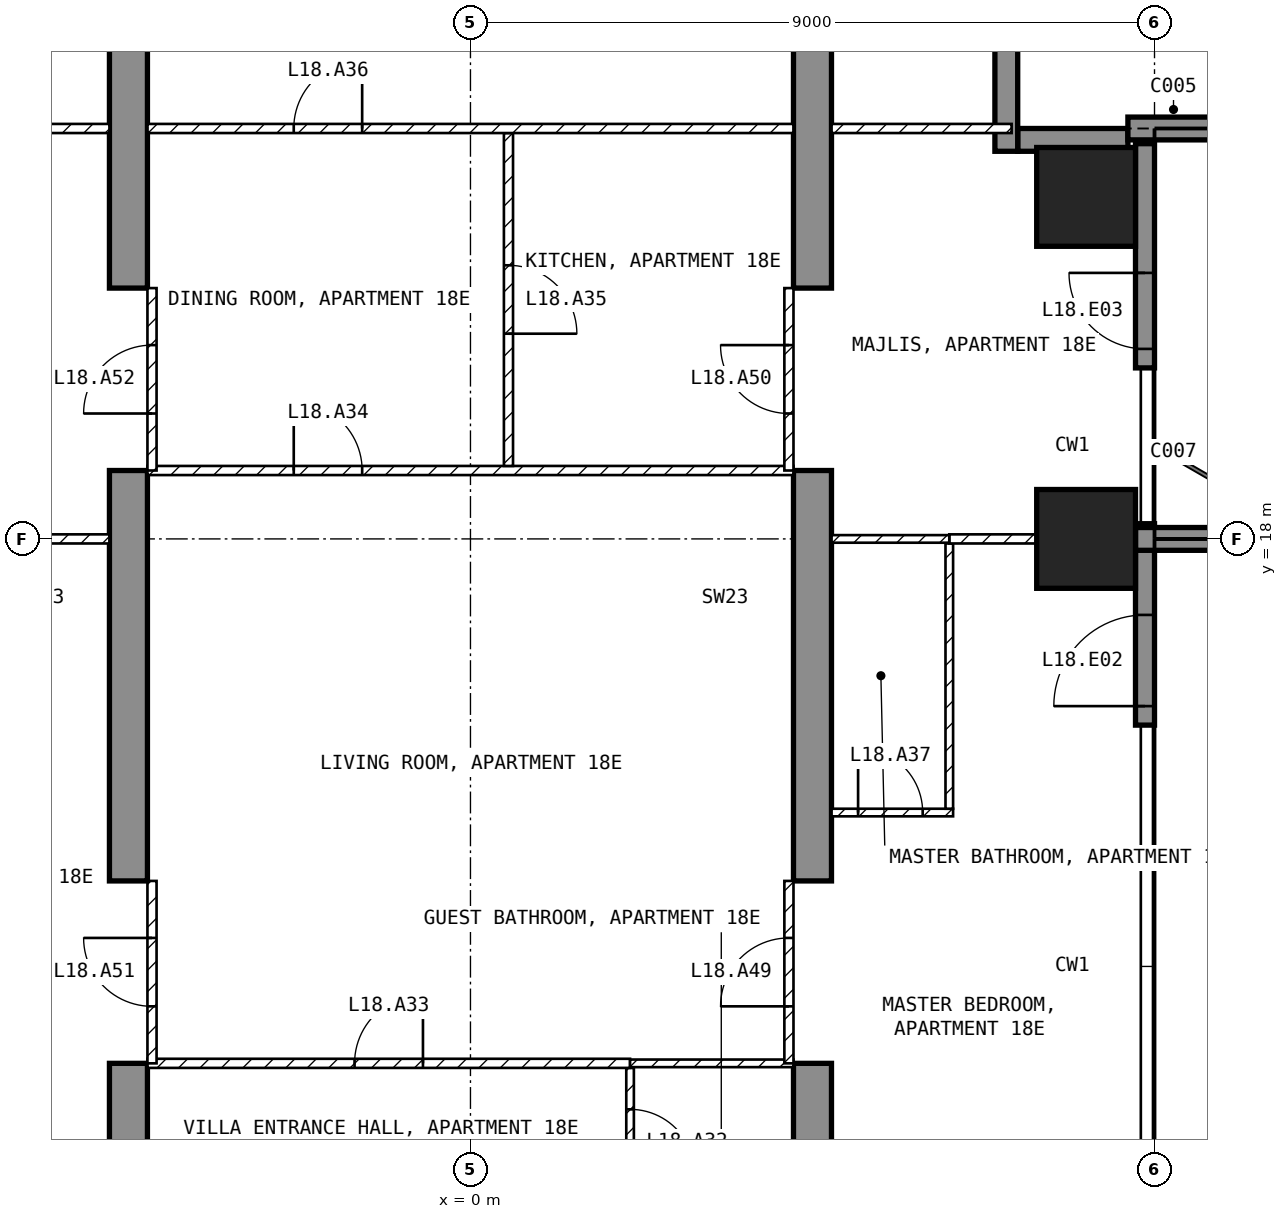
"""IFC4 building model, lengths in metres.
Left out: names, types, materials, properties, quantities, classifications, styles, units other than length and angle.
Written with IfcOpenShell. Run it as: python <this file> out.ifc"""

import sys

from ifc_helpers import new_model, si_unit, direction, frame, frame_2d, origin, origin_2d, place, context, subcontext, project, spatial, polyline, rectangle, outline, extrude, element, fill, save


model = new_model("IFC4")
c1 = context("Model", 3, precision=1e-05, world=origin(), true_north=direction((0.0, 1.0)))
c2 = subcontext(c1, "Body", "Model", "MODEL_VIEW")
j1 = project(units=[si_unit("LENGTHUNIT", "METRE"), si_unit("PLANEANGLEUNIT", "RADIAN")], contexts=[c1])
p1 = place(None, origin())
s1 = spatial("IfcSite", under=j1, at=p1, CompositionType="ELEMENT")
p2 = place(p1, origin())
s2 = spatial("IfcBuilding", under=s1, at=p2, CompositionType="ELEMENT")
p3 = place(p2, frame((0.0, 0.0, 82.0)))
s3 = spatial("IfcBuildingStorey", under=s2, at=p3, CompositionType="ELEMENT", Elevation=82.0)
for number, where, z_axis, x_axis in (
    (1, (8.1, 18.0, -0.25), (0.0, 0.0, 1.0), (1.0, 0.0, 0.0)),
    (2, (8.1, 22.5, -0.25), (0.0, 0.0, 1.0), (1.0, 0.0, 0.0)),
):
    element("IfcColumn", number, at=place(p3, frame(where, z_axis=z_axis, x_axis=x_axis)), inside=s3, PredefinedType="COLUMN", context=c2, shape_type="SweptSolid", body=[
        extrude(rectangle(XDim=1.3, YDim=1.3, at=origin_2d()), origin(), (0.0, 0.0, 1.0), 3.5),
    ])
for number, where, z_axis, x_axis in (
    (3, (-4.75, 9.0, -0.25), (1.0, 0.0, 0.0), (0.0, 1.0, 0.0)),
    (4, (4.25, 9.0, -0.25), (1.0, 0.0, 0.0), (0.0, 1.0, 0.0)),
):
    element("IfcWall", number, at=place(p3, frame(where, z_axis=z_axis, x_axis=x_axis)), inside=s3, PredefinedType="SHEAR", context=c2, shape_type="SweptSolid", body=[
        extrude(outline(polyline([(0.0, 0.0), (2.1, 0.0), (2.1, 2.65), (4.5, 2.65), (4.5, 0.0), (9.9, 0.0), (9.9, 2.65), (12.3, 2.65), (12.3, 0.0), (16.45, 0.0), (16.45, 3.5), (0.0, 3.5), (0.0, 0.0)])), origin(), (0.0, 0.0, 1.0), 0.5),
    ])
p4 = place(p3, frame((8.875, 15.55, 0.0), z_axis=(0.0, 0.0, 1.0), x_axis=(0.0, 1.0, 0.0)))
e5 = element("IfcWall", 5, at=p4, inside=s3, PredefinedType="SOLIDWALL", context=c2, shape_type="SweptSolid", body=[
    extrude(rectangle(XDim=2.65, YDim=0.25, at=frame_2d((1.325, 0.0))), origin(), (0.0, 0.0, 1.0), 3.25),
])
p5 = place(p4, frame((0.25, 0.0, 0.0)))
e6 = element("IfcOpeningElement", 6, at=p5, cuts=e5, PredefinedType="OPENING", context=c2, shape_type="SweptSolid", body=[
    extrude(rectangle(XDim=1.2, YDim=2.4, at=frame_2d((0.6, 1.2))), frame((0.0, 0.135, 0.0), z_axis=(0.0, -1.0, 0.0), x_axis=(1.0, 0.0, 0.0)), (0.0, 0.0, 1.0), 0.27),
])
p6 = place(p3, frame((8.875, 20.25, 0.0), z_axis=(0.0, 0.0, 1.0), x_axis=(0.0, 1.0, 0.0)))
e7 = element("IfcWall", 7, at=p6, inside=s3, PredefinedType="SOLIDWALL", context=c2, shape_type="SweptSolid", body=[
    extrude(rectangle(XDim=2.95, YDim=0.25, at=frame_2d((1.475, 0.0))), origin(), (0.0, 0.0, 1.0), 3.25),
])
p7 = place(p6, frame((0.25, 0.0, 0.0)))
e8 = element("IfcOpeningElement", 8, at=p7, cuts=e7, PredefinedType="OPENING", context=c2, shape_type="SweptSolid", body=[
    extrude(rectangle(XDim=1.0, YDim=2.4, at=frame_2d((0.5, 1.2))), frame((0.0, 0.135, 0.0), z_axis=(0.0, -1.0, 0.0), x_axis=(1.0, 0.0, 0.0)), (0.0, 0.0, 1.0), 0.27),
])
p8 = place(p3, frame((8.65, 23.25, 0.0), z_axis=(0.0, 0.0, 1.0), x_axis=(-1.0, 0.0, 0.0)))
e9 = element("IfcWall", 9, at=p8, inside=s3, PredefinedType="SOLIDWALL", context=c2, shape_type="SweptSolid", body=[
    extrude(rectangle(XDim=1.45, YDim=0.3, at=frame_2d((0.725, 0.0))), origin(), (0.0, 0.0, 1.0), 3.25),
])
p9 = place(p3, frame((7.05, 23.1, 0.0), z_axis=(0.0, 0.0, 1.0), x_axis=(0.0, 1.0, 0.0)))
e10 = element("IfcWall", 10, at=p9, inside=s3, PredefinedType="SOLIDWALL", context=c2, shape_type="SweptSolid", body=[
    extrude(rectangle(XDim=1.8, YDim=0.3, at=frame_2d((0.9, 0.0))), origin(), (0.0, 0.0, 1.0), 3.25),
])
p10 = place(p3, frame((8.75, 18.0, 0.0), z_axis=(0.0, 0.0, 1.0), x_axis=(1.0, 0.0, 0.0)))
e11 = element("IfcWall", 11, at=p10, inside=s3, PredefinedType="SOLIDWALL", context=c2, shape_type="SweptSolid", body=[
    extrude(rectangle(XDim=2.95, YDim=0.3, at=frame_2d((1.475, 0.0))), origin(), (0.0, 0.0, 1.0), 3.25),
])
p11 = place(p3, frame((8.65, 23.4, 0.0), z_axis=(0.0, 0.0, 1.0), x_axis=(1.0, 0.0, 0.0)))
e12 = element("IfcWall", 12, at=p11, inside=s3, PredefinedType="SOLIDWALL", context=c2, shape_type="SweptSolid", body=[
    extrude(rectangle(XDim=3.05, YDim=0.3, at=frame_2d((1.525, 0.0))), origin(), (0.0, 0.0, 1.0), 3.25),
])
p12 = place(p3, frame((2.1, 11.04, 0.0), z_axis=(0.0, 0.0, 1.0), x_axis=(0.0, -1.0, 0.0)))
e13 = element("IfcWall", 13, at=p12, inside=s3, PredefinedType="PARTITIONING", context=c2, shape_type="SweptSolid", body=[
    extrude(rectangle(XDim=1.94, YDim=0.1, at=frame_2d((0.97, 0.0))), origin(), (0.0, 0.0, 1.0), 3.25),
])
p13 = place(p12, frame((0.545, 0.0, 0.0)))
e14 = element("IfcOpeningElement", 14, at=p13, cuts=e13, PredefinedType="OPENING", context=c2, shape_type="SweptSolid", body=[
    extrude(rectangle(XDim=0.85, YDim=2.1, at=frame_2d((0.425, 1.05))), frame((0.0, 0.06, 0.0), z_axis=(0.0, -1.0, 0.0), x_axis=(1.0, 0.0, 0.0)), (0.0, 0.0, 1.0), 0.12),
])
p14 = place(p3, frame((-4.25, 11.1, 0.0), z_axis=(0.0, 0.0, 1.0), x_axis=(1.0, 0.0, 0.0)))
e15 = element("IfcWall", 15, at=p14, inside=s3, PredefinedType="PARTITIONING", context=c2, shape_type="SweptSolid", body=[
    extrude(rectangle(XDim=6.35, YDim=0.12, at=frame_2d((3.175, 0.0))), origin(), (0.0, 0.0, 1.0), 3.25),
])
p15 = place(p14, frame((2.725, 0.0, 0.0)))
e16 = element("IfcOpeningElement", 16, at=p15, cuts=e15, PredefinedType="OPENING", context=c2, shape_type="SweptSolid", body=[
    extrude(rectangle(XDim=0.9, YDim=2.1, at=frame_2d((0.45, 1.05))), frame((0.0, 0.07, 0.0), z_axis=(0.0, -1.0, 0.0), x_axis=(1.0, 0.0, 0.0)), (0.0, 0.0, 1.0), 0.14),
])
p16 = place(p3, frame((2.1, 11.1, 0.0), z_axis=(0.0, 0.0, 1.0), x_axis=(1.0, 0.0, 0.0)))
e17 = element("IfcWall", 17, at=p16, inside=s3, PredefinedType="PARTITIONING", context=c2, shape_type="SweptSolid", body=[
    extrude(rectangle(XDim=2.15, YDim=0.1, at=frame_2d((1.075, 0.0))), origin(), (0.0, 0.0, 1.0), 3.25),
])
p17 = place(p3, frame((-4.25, 18.9, 0.0), z_axis=(0.0, 0.0, 1.0), x_axis=(1.0, 0.0, 0.0)))
e18 = element("IfcWall", 18, at=p17, inside=s3, PredefinedType="PARTITIONING", context=c2, shape_type="SweptSolid", body=[
    extrude(rectangle(XDim=8.5, YDim=0.12, at=frame_2d((4.25, 0.0))), origin(), (0.0, 0.0, 1.0), 3.25),
])
p18 = place(p17, frame((1.925, 0.0, 0.0)))
e19 = element("IfcOpeningElement", 19, at=p18, cuts=e18, PredefinedType="OPENING", context=c2, shape_type="SweptSolid", body=[
    extrude(rectangle(XDim=0.9, YDim=2.1, at=frame_2d((0.45, 1.05))), frame((0.0, 0.07, 0.0), z_axis=(0.0, -1.0, 0.0), x_axis=(1.0, 0.0, 0.0)), (0.0, 0.0, 1.0), 0.14),
])
p19 = place(p3, frame((0.5, 23.34, 0.0), z_axis=(0.0, 0.0, 1.0), x_axis=(0.0, -1.0, 0.0)))
e20 = element("IfcWall", 20, at=p19, inside=s3, PredefinedType="PARTITIONING", context=c2, shape_type="SweptSolid", body=[
    extrude(rectangle(XDim=4.38, YDim=0.12, at=frame_2d((2.19, 0.0))), origin(), (0.0, 0.0, 1.0), 3.25),
])
p20 = place(p19, frame((1.74, 0.0, 0.0)))
e21 = element("IfcOpeningElement", 21, at=p20, cuts=e20, PredefinedType="OPENING", context=c2, shape_type="SweptSolid", body=[
    extrude(rectangle(XDim=0.9, YDim=2.1, at=frame_2d((0.45, 1.05))), frame((0.0, 0.07, 0.0), z_axis=(0.0, -1.0, 0.0), x_axis=(1.0, 0.0, 0.0)), (0.0, 0.0, 1.0), 0.14),
])
p21 = place(p3, frame((-4.25, 23.4, 0.0), z_axis=(0.0, 0.0, 1.0), x_axis=(1.0, 0.0, 0.0)))
e22 = element("IfcWall", 22, at=p21, inside=s3, PredefinedType="PARTITIONING", context=c2, shape_type="SweptSolid", body=[
    extrude(rectangle(XDim=8.5, YDim=0.12, at=frame_2d((4.25, 0.0))), origin(), (0.0, 0.0, 1.0), 3.25),
])
p22 = place(p21, frame((1.925, 0.0, 0.0)))
e23 = element("IfcOpeningElement", 23, at=p22, cuts=e22, PredefinedType="OPENING", context=c2, shape_type="SweptSolid", body=[
    extrude(rectangle(XDim=0.9, YDim=2.1, at=frame_2d((0.45, 1.05))), frame((0.0, 0.07, 0.0), z_axis=(0.0, -1.0, 0.0), x_axis=(1.0, 0.0, 0.0)), (0.0, 0.0, 1.0), 0.14),
])
p23 = place(p3, frame((4.75, 14.4, 0.0), z_axis=(0.0, 0.0, 1.0), x_axis=(1.0, 0.0, 0.0)))
e24 = element("IfcWall", 24, at=p23, inside=s3, PredefinedType="PARTITIONING", context=c2, shape_type="SweptSolid", body=[
    extrude(rectangle(XDim=1.6, YDim=0.1, at=frame_2d((0.8, 0.0))), origin(), (0.0, 0.0, 1.0), 3.25),
])
p24 = place(p23, frame((0.35, 0.0, 0.0)))
e25 = element("IfcOpeningElement", 25, at=p24, cuts=e24, PredefinedType="OPENING", context=c2, shape_type="SweptSolid", body=[
    extrude(rectangle(XDim=0.85, YDim=2.1, at=frame_2d((0.425, 1.05))), frame((0.0, 0.06, 0.0), z_axis=(0.0, -1.0, 0.0), x_axis=(1.0, 0.0, 0.0)), (0.0, 0.0, 1.0), 0.12),
])
p25 = place(p3, frame((6.3, 14.45, 0.0), z_axis=(0.0, 0.0, 1.0), x_axis=(0.0, 1.0, 0.0)))
e26 = element("IfcWall", 26, at=p25, inside=s3, PredefinedType="PARTITIONING", context=c2, shape_type="SweptSolid", body=[
    extrude(rectangle(XDim=3.49, YDim=0.1, at=frame_2d((1.745, 0.0))), origin(), (0.0, 0.0, 1.0), 3.25),
])
p26 = place(p3, frame((6.3, 18.0, 0.0), z_axis=(0.0, 0.0, 1.0), x_axis=(1.0, 0.0, 0.0)))
e27 = element("IfcWall", 27, at=p26, inside=s3, PredefinedType="PARTITIONING", context=c2, shape_type="SweptSolid", body=[
    extrude(rectangle(XDim=1.15, YDim=0.12, at=frame_2d((0.575, 0.0))), origin(), (0.0, 0.0, 1.0), 2.346),
])
p27 = place(p3, frame((4.75, 18.0, 0.0), z_axis=(0.0, 0.0, 1.0), x_axis=(1.0, 0.0, 0.0)))
e28 = element("IfcWall", 28, at=p27, inside=s3, PredefinedType="PARTITIONING", context=c2, shape_type="SweptSolid", body=[
    extrude(rectangle(XDim=1.55, YDim=0.1, at=frame_2d((0.775, 0.0))), origin(), (0.0, 0.0, 1.0), 2.346),
])
p28 = place(p3, frame((4.75, 23.4, 0.0), z_axis=(0.0, 0.0, 1.0), x_axis=(1.0, 0.0, 0.0)))
e29 = element("IfcWall", 29, at=p28, inside=s3, PredefinedType="PARTITIONING", context=c2, shape_type="SweptSolid", body=[
    extrude(rectangle(XDim=2.37, YDim=0.12, at=frame_2d((1.185, 0.0))), origin(), (0.0, 0.0, 1.0), 3.25),
])
p29 = place(p3, frame((-7.45, 18.0, 0.0), z_axis=(0.0, 0.0, 1.0), x_axis=(1.0, 0.0, 0.0)))
e30 = element("IfcWall", 30, at=p29, inside=s3, PredefinedType="PARTITIONING", context=c2, shape_type="SweptSolid", body=[
    extrude(rectangle(XDim=2.7, YDim=0.12, at=frame_2d((1.35, 0.0))), origin(), (0.0, 0.0, 1.0), 2.346),
])
p30 = place(p3, frame((-7.12, 23.4, 0.0), z_axis=(0.0, 0.0, 1.0), x_axis=(1.0, 0.0, 0.0)))
e31 = element("IfcWall", 31, at=p30, inside=s3, PredefinedType="PARTITIONING", context=c2, shape_type="SweptSolid", body=[
    extrude(rectangle(XDim=2.37, YDim=0.12, at=frame_2d((1.185, 0.0))), origin(), (0.0, 0.0, 1.0), 3.25),
])
p31 = place(p3, frame((4.19, 11.1, 0.0), z_axis=(0.0, 0.0, 1.0), x_axis=(0.0, 1.0, 0.0)))
e32 = element("IfcWall", 32, at=p31, inside=s3, PredefinedType="PARTITIONING", context=c2, shape_type="SweptSolid", body=[
    extrude(rectangle(XDim=2.4, YDim=0.12, at=frame_2d((1.2, 0.0))), origin(), (0.0, 0.0, 1.0), 2.4),
])
p32 = place(p31, frame((0.75, 0.0, 0.0)))
e33 = element("IfcOpeningElement", 33, at=p32, cuts=e32, PredefinedType="OPENING", context=c2, shape_type="SweptSolid", body=[
    extrude(rectangle(XDim=0.9, YDim=2.1, at=frame_2d((0.45, 1.05))), frame((0.0, 0.07, 0.0), z_axis=(0.0, -1.0, 0.0), x_axis=(1.0, 0.0, 0.0)), (0.0, 0.0, 1.0), 0.14),
])
p33 = place(p3, frame((4.19, 18.9, 0.0), z_axis=(0.0, 0.0, 1.0), x_axis=(0.0, 1.0, 0.0)))
e34 = element("IfcWall", 34, at=p33, inside=s3, PredefinedType="PARTITIONING", context=c2, shape_type="SweptSolid", body=[
    extrude(rectangle(XDim=2.4, YDim=0.12, at=frame_2d((1.2, 0.0))), origin(), (0.0, 0.0, 1.0), 2.4),
])
p34 = place(p33, frame((0.75, 0.0, 0.0)))
e35 = element("IfcOpeningElement", 35, at=p34, cuts=e34, PredefinedType="OPENING", context=c2, shape_type="SweptSolid", body=[
    extrude(rectangle(XDim=0.9, YDim=2.1, at=frame_2d((0.45, 1.05))), frame((0.0, 0.07, 0.0), z_axis=(0.0, -1.0, 0.0), x_axis=(1.0, 0.0, 0.0)), (0.0, 0.0, 1.0), 0.14),
])
p35 = place(p3, frame((-4.19, 11.1, 0.0), z_axis=(0.0, 0.0, 1.0), x_axis=(0.0, 1.0, 0.0)))
e36 = element("IfcWall", 36, at=p35, inside=s3, PredefinedType="PARTITIONING", context=c2, shape_type="SweptSolid", body=[
    extrude(rectangle(XDim=2.4, YDim=0.12, at=frame_2d((1.2, 0.0))), origin(), (0.0, 0.0, 1.0), 2.4),
])
p36 = place(p35, frame((0.75, 0.0, 0.0)))
e37 = element("IfcOpeningElement", 37, at=p36, cuts=e36, PredefinedType="OPENING", context=c2, shape_type="SweptSolid", body=[
    extrude(rectangle(XDim=0.9, YDim=2.1, at=frame_2d((0.45, 1.05))), frame((0.0, 0.07, 0.0), z_axis=(0.0, -1.0, 0.0), x_axis=(1.0, 0.0, 0.0)), (0.0, 0.0, 1.0), 0.14),
])
p37 = place(p3, frame((-4.19, 18.9, 0.0), z_axis=(0.0, 0.0, 1.0), x_axis=(0.0, 1.0, 0.0)))
e38 = element("IfcWall", 38, at=p37, inside=s3, PredefinedType="PARTITIONING", context=c2, shape_type="SweptSolid", body=[
    extrude(rectangle(XDim=2.4, YDim=0.12, at=frame_2d((1.2, 0.0))), origin(), (0.0, 0.0, 1.0), 2.4),
])
p38 = place(p37, frame((0.75, 0.0, 0.0)))
e39 = element("IfcOpeningElement", 39, at=p38, cuts=e38, PredefinedType="OPENING", context=c2, shape_type="SweptSolid", body=[
    extrude(rectangle(XDim=0.9, YDim=2.1, at=frame_2d((0.45, 1.05))), frame((0.0, 0.07, 0.0), z_axis=(0.0, -1.0, 0.0), x_axis=(1.0, 0.0, 0.0)), (0.0, 0.0, 1.0), 0.14),
])
p39 = place(p5, origin())
e40 = element("IfcDoor", 40, at=p39, inside=s3, OperationType="SINGLE_SWING_LEFT", PredefinedType="DOOR", context=c2, shape_type="SweptSolid", body=[
    extrude(rectangle(XDim=1.2, YDim=2.4, at=frame_2d((0.6, 1.2))), frame((0.0, 0.025, 0.0), z_axis=(0.0, -1.0, 0.0), x_axis=(1.0, 0.0, 0.0)), (0.0, 0.0, 1.0), 0.05),
])
fill(e6, e40)
p40 = place(p7, origin())
e41 = element("IfcDoor", 41, at=p40, inside=s3, OperationType="SINGLE_SWING_RIGHT", PredefinedType="DOOR", context=c2, shape_type="SweptSolid", body=[
    extrude(rectangle(XDim=1.0, YDim=2.4, at=frame_2d((0.5, 1.2))), frame((0.0, 0.025, 0.0), z_axis=(0.0, -1.0, 0.0), x_axis=(1.0, 0.0, 0.0)), (0.0, 0.0, 1.0), 0.05),
])
fill(e8, e41)
p41 = place(p13, origin())
e42 = element("IfcDoor", 42, at=p41, inside=s3, OperationType="SINGLE_SWING_RIGHT", PredefinedType="DOOR", context=c2, shape_type="SweptSolid", body=[
    extrude(rectangle(XDim=0.85, YDim=2.1, at=frame_2d((0.425, 1.05))), frame((0.0, 0.025, 0.0), z_axis=(0.0, -1.0, 0.0), x_axis=(1.0, 0.0, 0.0)), (0.0, 0.0, 1.0), 0.05),
])
fill(e14, e42)
p42 = place(p15, origin())
e43 = element("IfcDoor", 43, at=p42, inside=s3, OperationType="SINGLE_SWING_RIGHT", PredefinedType="DOOR", context=c2, shape_type="SweptSolid", body=[
    extrude(rectangle(XDim=0.9, YDim=2.1, at=frame_2d((0.45, 1.05))), frame((0.0, 0.025, 0.0), z_axis=(0.0, -1.0, 0.0), x_axis=(1.0, 0.0, 0.0)), (0.0, 0.0, 1.0), 0.05),
])
fill(e16, e43)
p43 = place(p18, origin())
e44 = element("IfcDoor", 44, at=p43, inside=s3, OperationType="SINGLE_SWING_LEFT", PredefinedType="DOOR", context=c2, shape_type="SweptSolid", body=[
    extrude(rectangle(XDim=0.9, YDim=2.1, at=frame_2d((0.45, 1.05))), frame((0.0, 0.025, 0.0), z_axis=(0.0, -1.0, 0.0), x_axis=(1.0, 0.0, 0.0)), (0.0, 0.0, 1.0), 0.05),
])
fill(e19, e44)
p44 = place(p20, origin())
e45 = element("IfcDoor", 45, at=p44, inside=s3, OperationType="SINGLE_SWING_RIGHT", PredefinedType="DOOR", context=c2, shape_type="SweptSolid", body=[
    extrude(rectangle(XDim=0.9, YDim=2.1, at=frame_2d((0.45, 1.05))), frame((0.0, 0.025, 0.0), z_axis=(0.0, -1.0, 0.0), x_axis=(1.0, 0.0, 0.0)), (0.0, 0.0, 1.0), 0.05),
])
fill(e21, e45)
p45 = place(p22, origin())
e46 = element("IfcDoor", 46, at=p45, inside=s3, OperationType="SINGLE_SWING_RIGHT", PredefinedType="DOOR", context=c2, shape_type="SweptSolid", body=[
    extrude(rectangle(XDim=0.9, YDim=2.1, at=frame_2d((0.45, 1.05))), frame((0.0, 0.025, 0.0), z_axis=(0.0, -1.0, 0.0), x_axis=(1.0, 0.0, 0.0)), (0.0, 0.0, 1.0), 0.05),
])
fill(e23, e46)
p46 = place(p24, origin())
e47 = element("IfcDoor", 47, at=p46, inside=s3, OperationType="SINGLE_SWING_LEFT", PredefinedType="DOOR", context=c2, shape_type="SweptSolid", body=[
    extrude(rectangle(XDim=0.85, YDim=2.1, at=frame_2d((0.425, 1.05))), frame((0.0, 0.025, 0.0), z_axis=(0.0, -1.0, 0.0), x_axis=(1.0, 0.0, 0.0)), (0.0, 0.0, 1.0), 0.05),
])
fill(e25, e47)
p47 = place(p32, origin())
e48 = element("IfcDoor", 48, at=p47, inside=s3, OperationType="SINGLE_SWING_LEFT", PredefinedType="DOOR", context=c2, shape_type="SweptSolid", body=[
    extrude(rectangle(XDim=0.9, YDim=2.1, at=frame_2d((0.45, 1.05))), frame((0.0, 0.025, 0.0), z_axis=(0.0, -1.0, 0.0), x_axis=(1.0, 0.0, 0.0)), (0.0, 0.0, 1.0), 0.05),
])
fill(e33, e48)
p48 = place(p34, origin())
e49 = element("IfcDoor", 49, at=p48, inside=s3, OperationType="SINGLE_SWING_RIGHT", PredefinedType="DOOR", context=c2, shape_type="SweptSolid", body=[
    extrude(rectangle(XDim=0.9, YDim=2.1, at=frame_2d((0.45, 1.05))), frame((0.0, 0.025, 0.0), z_axis=(0.0, -1.0, 0.0), x_axis=(1.0, 0.0, 0.0)), (0.0, 0.0, 1.0), 0.05),
])
fill(e35, e49)
p49 = place(p36, origin())
e50 = element("IfcDoor", 50, at=p49, inside=s3, OperationType="SINGLE_SWING_RIGHT", PredefinedType="DOOR", context=c2, shape_type="SweptSolid", body=[
    extrude(rectangle(XDim=0.9, YDim=2.1, at=frame_2d((0.45, 1.05))), frame((0.0, 0.025, 0.0), z_axis=(0.0, -1.0, 0.0), x_axis=(1.0, 0.0, 0.0)), (0.0, 0.0, 1.0), 0.05),
])
fill(e37, e50)
p50 = place(p38, origin())
e51 = element("IfcDoor", 51, at=p50, inside=s3, OperationType="SINGLE_SWING_LEFT", PredefinedType="DOOR", context=c2, shape_type="SweptSolid", body=[
    extrude(rectangle(XDim=0.9, YDim=2.1, at=frame_2d((0.45, 1.05))), frame((0.0, 0.025, 0.0), z_axis=(0.0, -1.0, 0.0), x_axis=(1.0, 0.0, 0.0)), (0.0, 0.0, 1.0), 0.05),
])
fill(e39, e51)
save(model, sys.argv[1])
